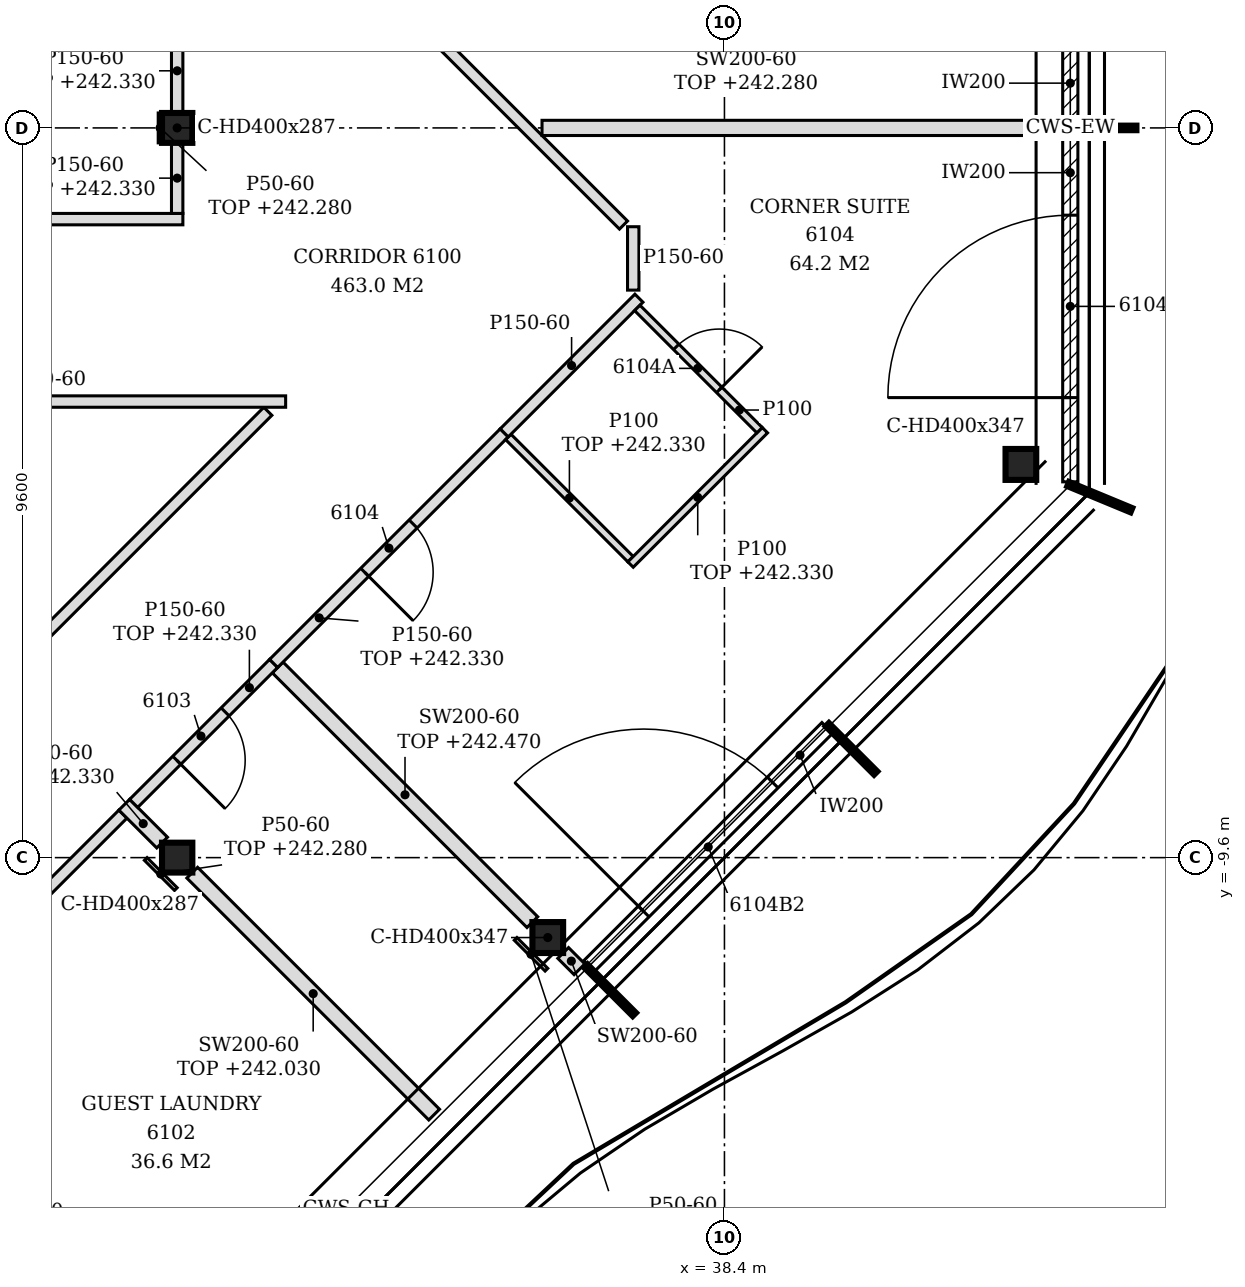
"""IFC4 building model, lengths in metres.
Left out: names, types, materials, properties, quantities, classifications, styles, units other than length and angle.
Written with IfcOpenShell. Run it as: python <this file> out.ifc"""

import sys

from ifc_helpers import new_model, si_unit, direction, frame, frame_2d, origin, origin_2d, place, context, subcontext, project, spatial, polyline, rectangle, i_section, outline, extrude, element, fill, save


model = new_model("IFC4")
c1 = context("Model", 3, precision=1e-05, world=origin(), true_north=direction((0.0, 1.0)))
c2 = subcontext(c1, "Body", "Model", "MODEL_VIEW")
j1 = project(units=[si_unit("LENGTHUNIT", "METRE"), si_unit("PLANEANGLEUNIT", "RADIAN")], contexts=[c1])
p1 = place(None, origin())
s1 = spatial("IfcSite", under=j1, at=p1, CompositionType="ELEMENT")
p2 = place(p1, origin())
s2 = spatial("IfcBuilding", under=s1, at=p2, CompositionType="ELEMENT")
p3 = place(p2, frame((0.0, 0.0, 239.4)))
s3 = spatial("IfcBuildingStorey", under=s2, at=p3, CompositionType="ELEMENT", Elevation=239.4)
for number, where, z_axis, x_axis in (
    (1, (36.076, -10.652, -0.15), (0.0, 0.0, 1.0), (1.0, 0.0, 0.0)),
    (2, (42.3, -4.427, -0.15), (0.0, 0.0, 1.0), (1.0, 0.0, 0.0)),
):
    element("IfcColumn", number, at=place(p3, frame(where, z_axis=z_axis, x_axis=x_axis)), inside=s3, PredefinedType="COLUMN", context=c2, shape_type="SweptSolid", body=[
        extrude(i_section(OverallWidth=0.404, OverallDepth=0.407, WebThickness=0.027, FlangeThickness=0.044, FilletRadius=0.015, at=origin_2d()), origin(), (0.0, 0.0, 1.0), 3.6),
    ])
for number, where, z_axis, x_axis in (
    (3, (31.2, -9.6, -0.15), (0.0, 0.0, 1.0), (1.0, 0.0, 0.0)),
    (4, (31.2, 0.0, -0.15), (0.0, 0.0, 1.0), (1.0, 0.0, 0.0)),
):
    element("IfcColumn", number, at=place(p3, frame(where, z_axis=z_axis, x_axis=x_axis)), inside=s3, PredefinedType="COLUMN", context=c2, shape_type="SweptSolid", body=[
        extrude(i_section(OverallWidth=0.399, OverallDepth=0.393, WebThickness=0.023, FlangeThickness=0.037, FilletRadius=0.015, at=origin_2d()), origin(), (0.0, 0.0, 1.0), 3.6),
    ])
p4 = place(p3, frame((36.62, -11.026, 0.0), z_axis=(0.0, 0.0, 1.0), x_axis=(0.707106781187, 0.707106781187, 0.0)))
e5 = element("IfcWall", 5, at=p4, inside=s3, PredefinedType="NOTDEFINED", context=c2, shape_type="SweptSolid", body=[
    extrude(rectangle(XDim=4.431, YDim=0.2, at=frame_2d((2.215, 0.0))), origin(), (0.0, 0.0, 1.0), 3.45),
])
p5 = place(p4, frame((1.015, 0.0, 0.0)))
e6 = element("IfcOpeningElement", 6, at=p5, cuts=e5, PredefinedType="OPENING", context=c2, shape_type="SweptSolid", body=[
    extrude(rectangle(XDim=2.4, YDim=2.4, at=frame_2d((1.2, 1.2))), frame((0.0, 0.11, 0.0), z_axis=(0.0, -1.0, 0.0), x_axis=(1.0, 0.0, 0.0)), (0.0, 0.0, 1.0), 0.22),
])
p6 = place(p3, frame((42.95, -4.656, 0.0), z_axis=(0.0, 0.0, 1.0), x_axis=(0.0, 1.0, 0.0)))
e7 = element("IfcWall", 7, at=p6, inside=s3, PredefinedType="NOTDEFINED", context=c2, shape_type="SweptSolid", body=[
    extrude(rectangle(XDim=4.626, YDim=0.2, at=frame_2d((2.313, 0.0))), origin(), (0.0, 0.0, 1.0), 3.45),
])
p7 = place(p6, frame((1.108, 0.0, 0.0)))
e8 = element("IfcOpeningElement", 8, at=p7, cuts=e7, PredefinedType="OPENING", context=c2, shape_type="SweptSolid", body=[
    extrude(rectangle(XDim=2.4, YDim=2.4, at=frame_2d((1.2, 1.2))), frame((0.0, 0.11, 0.0), z_axis=(0.0, -1.0, 0.0), x_axis=(1.0, 0.0, 0.0)), (0.0, 0.0, 1.0), 0.22),
])
p8 = place(p3, frame((42.95, 0.03, 0.0), z_axis=(0.0, 0.0, 1.0), x_axis=(0.0, 1.0, 0.0)))
e9 = element("IfcWall", 9, at=p8, inside=s3, PredefinedType="NOTDEFINED", context=c2, shape_type="SweptSolid", body=[
    extrude(rectangle(XDim=4.626, YDim=0.2, at=frame_2d((2.313, 0.0))), origin(), (0.0, 0.0, 1.0), 3.45),
])
p9 = place(p8, frame((1.118, 0.0, 0.0)))
e10 = element("IfcOpeningElement", 10, at=p9, cuts=e9, PredefinedType="OPENING", context=c2, shape_type="SweptSolid", body=[
    extrude(rectangle(XDim=2.4, YDim=2.4, at=frame_2d((1.2, 1.2))), frame((0.0, 0.11, 0.0), z_axis=(0.0, -1.0, 0.0), x_axis=(1.0, 0.0, 0.0)), (0.0, 0.0, 1.0), 0.22),
])
p10 = place(p3, frame((29.649, -16.673, 0.0), z_axis=(0.0, 0.0, 1.0), x_axis=(-0.707181695824, 0.707031858612, 0.0)))
e11 = element("IfcWall", 11, at=p10, inside=s3, PredefinedType="PARTITIONING", context=c2, shape_type="SweptSolid", body=[
    extrude(rectangle(XDim=4.888, YDim=0.2, at=frame_2d((2.444, 0.0))), origin(), (0.0, 0.0, 1.0), 2.88),
])
p11 = place(p3, frame((26.316, -13.199, 0.0), z_axis=(0.0, 0.0, 1.0), x_axis=(0.707024001185, 0.707189551498, 0.0)))
e12 = element("IfcWall", 12, at=p11, inside=s3, PredefinedType="PARTITIONING", context=c2, shape_type="SweptSolid", body=[
    extrude(rectangle(XDim=5.899, YDim=0.15, at=frame_2d((2.949, 0.0))), origin(), (0.0, 0.0, 1.0), 2.88),
])
p12 = place(p11, frame((2.5, 0.0, 0.0)))
e13 = element("IfcOpeningElement", 13, at=p12, cuts=e12, PredefinedType="OPENING", context=c2, shape_type="SweptSolid", body=[
    extrude(rectangle(XDim=0.9, YDim=2.1, at=frame_2d((0.45, 1.05))), frame((0.0, 0.085, 0.0), z_axis=(0.0, -1.0, 0.0), x_axis=(1.0, 0.0, 0.0)), (0.0, 0.0, 1.0), 0.17),
])
p13 = place(p3, frame((34.581, -12.981, 0.0), z_axis=(0.0, 0.0, 1.0), x_axis=(-0.707133900936, 0.707079660397, 0.0)))
e14 = element("IfcWall", 14, at=p13, inside=s3, PredefinedType="PARTITIONING", context=c2, shape_type="SweptSolid", body=[
    extrude(rectangle(XDim=4.501, YDim=0.2, at=frame_2d((2.25, 0.0))), origin(), (0.0, 0.0, 1.0), 2.63),
])
p14 = place(p3, frame((24.468, -11.653, 0.0), z_axis=(0.0, 0.0, 1.0), x_axis=(0.707095889299, 0.707117672906, 0.0)))
e15 = element("IfcWall", 15, at=p14, inside=s3, PredefinedType="PARTITIONING", context=c2, shape_type="SweptSolid", body=[
    extrude(rectangle(XDim=11.208, YDim=0.15, at=frame_2d((5.604, 0.0))), origin(), (0.0, 0.0, 1.0), 2.88),
])
p15 = place(p3, frame((36.493, -11.069, 0.0), z_axis=(0.0, 0.0, 1.0), x_axis=(-0.707106781187, 0.707106781187, 0.0)))
e16 = element("IfcWall", 16, at=p15, inside=s3, PredefinedType="PARTITIONING", context=c2, shape_type="SweptSolid", body=[
    extrude(rectangle(XDim=0.303, YDim=0.2, at=frame_2d((0.152, 0.0))), origin(), (0.0, 0.0, 1.0), 3.45),
])
p16 = place(p3, frame((35.873, -10.449, 0.0), z_axis=(0.0, 0.0, 1.0), x_axis=(-0.707081021846, 0.707132539589, 0.0)))
e17 = element("IfcWall", 17, at=p16, inside=s3, PredefinedType="PARTITIONING", context=c2, shape_type="SweptSolid", body=[
    extrude(rectangle(XDim=4.739, YDim=0.2, at=frame_2d((2.37, 0.0))), origin(), (0.0, 0.0, 1.0), 3.07),
])
p17 = place(p3, frame((31.002, -9.402, 0.0), z_axis=(0.0, 0.0, 1.0), x_axis=(-0.707106781187, 0.707106781187, 0.0)))
e18 = element("IfcWall", 18, at=p17, inside=s3, PredefinedType="PARTITIONING", context=c2, shape_type="SweptSolid", body=[
    extrude(rectangle(XDim=0.704, YDim=0.2, at=frame_2d((0.352, 0.0))), origin(), (0.0, 0.0, 1.0), 2.93),
])
p18 = place(p3, frame((30.628, -8.886, 0.0), z_axis=(0.0, 0.0, 1.0), x_axis=(0.707106781187, 0.707106781187, 0.0)))
e19 = element("IfcWall", 19, at=p18, inside=s3, PredefinedType="PARTITIONING", context=c2, shape_type="SweptSolid", body=[
    extrude(rectangle(XDim=2.604, YDim=0.15, at=frame_2d((1.302, 0.0))), origin(), (0.0, 0.0, 1.0), 2.93),
])
p19 = place(p18, frame((0.802, 0.0, 0.0)))
e20 = element("IfcOpeningElement", 20, at=p19, cuts=e19, PredefinedType="OPENING", context=c2, shape_type="SweptSolid", body=[
    extrude(rectangle(XDim=0.9, YDim=2.1, at=frame_2d((0.45, 1.05))), frame((0.0, 0.085, 0.0), z_axis=(0.0, -1.0, 0.0), x_axis=(1.0, 0.0, 0.0)), (0.0, 0.0, 1.0), 0.17),
])
p20 = place(p3, frame((32.469, -7.045, 0.0), z_axis=(0.0, 0.0, 1.0), x_axis=(0.70722059203, 0.706992952022, 0.0)))
e21 = element("IfcWall", 21, at=p20, inside=s3, PredefinedType="PARTITIONING", context=c2, shape_type="SweptSolid", body=[
    extrude(rectangle(XDim=4.29, YDim=0.15, at=frame_2d((2.145, 0.0))), origin(), (0.0, 0.0, 1.0), 2.93),
])
p21 = place(p20, frame((1.695, 0.0, 0.0)))
e22 = element("IfcOpeningElement", 22, at=p21, cuts=e21, PredefinedType="OPENING", context=c2, shape_type="SweptSolid", body=[
    extrude(rectangle(XDim=0.9, YDim=2.1, at=frame_2d((0.45, 1.05))), frame((0.0, 0.085, 0.0), z_axis=(0.0, -1.0, 0.0), x_axis=(1.0, 0.0, 0.0)), (0.0, 0.0, 1.0), 0.17),
])
p22 = place(p3, frame((37.165, -5.674, 0.0), z_axis=(0.0, 0.0, 1.0), x_axis=(-0.707106781187, 0.707106781187, 0.0)))
e23 = element("IfcWall", 23, at=p22, inside=s3, PredefinedType="PARTITIONING", context=c2, shape_type="SweptSolid", body=[
    extrude(rectangle(XDim=2.275, YDim=0.1, at=frame_2d((1.137, 0.0))), origin(), (0.0, 0.0, 1.0), 2.93),
])
p23 = place(p3, frame((37.165, -5.744, 0.0), z_axis=(0.0, 0.0, 1.0), x_axis=(0.707155609469, 0.707057949532, 0.0)))
e24 = element("IfcWall", 24, at=p23, inside=s3, PredefinedType="PARTITIONING", context=c2, shape_type="SweptSolid", body=[
    extrude(rectangle(XDim=2.5, YDim=0.1, at=frame_2d((1.25, 0.0))), origin(), (0.0, 0.0, 1.0), 2.93),
])
p24 = place(p3, frame((35.503, -4.012, 0.0), z_axis=(0.0, 0.0, 1.0), x_axis=(0.707106781187, 0.707106781187, 0.0)))
e25 = element("IfcWall", 25, at=p24, inside=s3, PredefinedType="PARTITIONING", context=c2, shape_type="SweptSolid", body=[
    extrude(rectangle(XDim=2.506, YDim=0.15, at=frame_2d((1.253, 0.0))), origin(), (0.0, 0.0, 1.0), 3.45),
])
p25 = place(p3, frame((38.862, -3.977, 0.0), z_axis=(0.0, 0.0, 1.0), x_axis=(-0.707106781187, 0.707106781187, 0.0)))
e26 = element("IfcWall", 26, at=p25, inside=s3, PredefinedType="PARTITIONING", context=c2, shape_type="SweptSolid", body=[
    extrude(rectangle(XDim=2.275, YDim=0.1, at=frame_2d((1.137, 0.0))), origin(), (0.0, 0.0, 1.0), 3.45),
])
p26 = place(p25, frame((0.75, 0.0, 0.0)))
e27 = element("IfcOpeningElement", 27, at=p26, cuts=e26, PredefinedType="OPENING", context=c2, shape_type="SweptSolid", body=[
    extrude(rectangle(XDim=0.8, YDim=2.1, at=frame_2d((0.4, 1.05))), frame((0.0, 0.06, 0.0), z_axis=(0.0, -1.0, 0.0), x_axis=(1.0, 0.0, 0.0)), (0.0, 0.0, 1.0), 0.12),
])
p27 = place(p3, frame((19.125, -3.6, 0.0), z_axis=(0.0, 0.0, 1.0), x_axis=(1.0, 0.0, 0.0)))
e28 = element("IfcWall", 28, at=p27, inside=s3, PredefinedType="PARTITIONING", context=c2, shape_type="SweptSolid", body=[
    extrude(outline(polyline([(0.0, 0.0), (13.502, 0.0), (13.502, 3.45), (12.225, 3.45), (12.223, 2.93), (11.925, 2.93), (11.923, 3.45), (0.225, 3.45), (0.223, 2.83), (0.0, 2.83), (0.0, 0.0)])), frame((0.0, 0.075, 0.0), z_axis=(0.0, -1.0, 0.0), x_axis=(1.0, 0.0, 0.0)), (0.0, 0.0, 1.0), 0.15),
])
p28 = place(p27, frame((6.286, 0.0, 0.0)))
e29 = element("IfcOpeningElement", 29, at=p28, cuts=e28, PredefinedType="OPENING", context=c2, shape_type="SweptSolid", body=[
    extrude(rectangle(XDim=0.9, YDim=2.1, at=frame_2d((0.45, 1.05))), frame((0.0, 0.085, 0.0), z_axis=(0.0, -1.0, 0.0), x_axis=(1.0, 0.0, 0.0)), (0.0, 0.0, 1.0), 0.17),
])
p29 = place(p3, frame((37.2, -2.134, 0.0), z_axis=(0.0, 0.0, 1.0), x_axis=(0.0, 1.0, 0.0)))
e30 = element("IfcWall", 30, at=p29, inside=s3, PredefinedType="PARTITIONING", context=c2, shape_type="SweptSolid", body=[
    extrude(rectangle(XDim=0.834, YDim=0.15, at=frame_2d((0.417, 0.0))), origin(), (0.0, 0.0, 1.0), 3.45),
])
p30 = place(p3, frame((37.072, -1.278, 0.0), z_axis=(0.0, 0.0, 1.0), x_axis=(-0.707106781187, 0.707106781187, 0.0)))
e31 = element("IfcWall", 31, at=p30, inside=s3, PredefinedType="PARTITIONING", context=c2, shape_type="SweptSolid", body=[
    extrude(rectangle(XDim=20.294, YDim=0.15, at=frame_2d((10.147, 0.0))), origin(), (0.0, 0.0, 1.0), 2.88),
])
p31 = place(p30, frame((3.824, 0.0, 0.0)))
e32 = element("IfcOpeningElement", 32, at=p31, cuts=e31, PredefinedType="OPENING", context=c2, shape_type="SweptSolid", body=[
    extrude(rectangle(XDim=0.9, YDim=2.1, at=frame_2d((0.45, 1.05))), frame((0.0, 0.085, 0.0), z_axis=(0.0, -1.0, 0.0), x_axis=(1.0, 0.0, 0.0)), (0.0, 0.0, 1.0), 0.17),
])
p32 = place(p30, frame((10.042, 0.0, 0.0)))
e33 = element("IfcOpeningElement", 33, at=p32, cuts=e31, PredefinedType="OPENING", context=c2, shape_type="SweptSolid", body=[
    extrude(rectangle(XDim=0.9, YDim=2.1, at=frame_2d((0.45, 1.05))), frame((0.0, 0.085, 0.0), z_axis=(0.0, -1.0, 0.0), x_axis=(1.0, 0.0, 0.0)), (0.0, 0.0, 1.0), 0.17),
])
p33 = place(p30, frame((14.443, 0.0, 0.0)))
e34 = element("IfcOpeningElement", 34, at=p33, cuts=e31, PredefinedType="OPENING", context=c2, shape_type="SweptSolid", body=[
    extrude(rectangle(XDim=0.9, YDim=2.1, at=frame_2d((0.45, 1.05))), frame((0.0, 0.085, 0.0), z_axis=(0.0, -1.0, 0.0), x_axis=(1.0, 0.0, 0.0)), (0.0, 0.0, 1.0), 0.17),
])
p34 = place(p3, frame((19.125, -1.2, 0.0), z_axis=(0.0, 0.0, 1.0), x_axis=(1.0, 0.0, 0.0)))
e35 = element("IfcWall", 35, at=p34, inside=s3, PredefinedType="PARTITIONING", context=c2, shape_type="SweptSolid", body=[
    extrude(outline(polyline([(0.0, 0.0), (12.15, 0.0), (12.15, 2.93), (11.925, 2.93), (11.923, 3.45), (0.225, 3.45), (0.223, 2.83), (0.0, 2.83), (0.0, 0.0)])), frame((0.0, 0.075, 0.0), z_axis=(0.0, -1.0, 0.0), x_axis=(1.0, 0.0, 0.0)), (0.0, 0.0, 1.0), 0.15),
])
p35 = place(p3, frame((31.2, -1.125, 0.0), z_axis=(0.0, 0.0, 1.0), x_axis=(0.0, 1.0, 0.0)))
e36 = element("IfcWall", 36, at=p35, inside=s3, PredefinedType="PARTITIONING", context=c2, shape_type="SweptSolid", body=[
    extrude(rectangle(XDim=0.928, YDim=0.15, at=frame_2d((0.464, 0.0))), origin(), (0.0, 0.0, 1.0), 2.93),
])
p36 = place(p3, frame((36.0, 0.0, 0.0), z_axis=(0.0, 0.0, 1.0), x_axis=(1.0, 0.0, 0.0)))
e37 = element("IfcWall", 37, at=p36, inside=s3, PredefinedType="PARTITIONING", context=c2, shape_type="SweptSolid", body=[
    extrude(rectangle(XDim=6.85, YDim=0.2, at=frame_2d((3.425, 0.0))), origin(), (0.0, 0.0, 1.0), 2.88),
])
p37 = place(p3, frame((31.2, 0.197, 0.0), z_axis=(0.0, 0.0, 1.0), x_axis=(0.0, 1.0, 0.0)))
e38 = element("IfcWall", 38, at=p37, inside=s3, PredefinedType="PARTITIONING", context=c2, shape_type="SweptSolid", body=[
    extrude(rectangle(XDim=1.11, YDim=0.15, at=frame_2d((0.555, 0.0))), origin(), (0.0, 0.0, 1.0), 2.93),
])
p38 = place(p3, frame((31.182, -10.014, 0.0), z_axis=(0.0, 0.0, 1.0), x_axis=(-0.707106781187, 0.707106781187, 0.0)))
e39 = element("IfcWall", 39, at=p38, inside=s3, PredefinedType="PARTITIONING", context=c2, shape_type="SweptSolid", body=[
    extrude(rectangle(XDim=0.56, YDim=0.05, at=frame_2d((0.28, 0.0))), origin(), (0.0, 0.0, 1.0), 2.88),
])
p39 = place(p3, frame((36.058, -11.075, 0.0), z_axis=(0.0, 0.0, 1.0), x_axis=(-0.707106781187, 0.707106781187, 0.0)))
e40 = element("IfcWall", 40, at=p39, inside=s3, PredefinedType="PARTITIONING", context=c2, shape_type="SweptSolid", body=[
    extrude(rectangle(XDim=0.573, YDim=0.05, at=frame_2d((0.287, 0.0))), origin(), (0.0, 0.0, 1.0), 2.63),
])
p40 = place(p3, frame((30.976, -0.197, 0.0), z_axis=(0.0, 0.0, 1.0), x_axis=(0.0, 1.0, 0.0)))
e41 = element("IfcWall", 41, at=p40, inside=s3, PredefinedType="PARTITIONING", context=c2, shape_type="SweptSolid", body=[
    extrude(rectangle(XDim=0.393, YDim=0.05, at=frame_2d((0.197, 0.0))), origin(), (0.0, 0.0, 1.0), 2.88),
])
p41 = place(p5, origin())
e42 = element("IfcDoor", 42, at=p41, inside=s3, OperationType="SINGLE_SWING_LEFT", PredefinedType="DOOR", context=c2, shape_type="SweptSolid", body=[
    extrude(rectangle(XDim=2.4, YDim=2.4, at=frame_2d((1.2, 1.2))), frame((0.0, 0.025, 0.0), z_axis=(0.0, -1.0, 0.0), x_axis=(1.0, 0.0, 0.0)), (0.0, 0.0, 1.0), 0.05),
])
fill(e6, e42)
p42 = place(p7, origin())
e43 = element("IfcDoor", 43, at=p42, inside=s3, OperationType="SINGLE_SWING_LEFT", PredefinedType="DOOR", context=c2, shape_type="SweptSolid", body=[
    extrude(rectangle(XDim=2.4, YDim=2.4, at=frame_2d((1.2, 1.2))), frame((0.0, 0.025, 0.0), z_axis=(0.0, -1.0, 0.0), x_axis=(1.0, 0.0, 0.0)), (0.0, 0.0, 1.0), 0.05),
])
fill(e8, e43)
p43 = place(p19, frame((0.9, 0.0, 0.0), z_axis=(0.0, 0.0, 1.0), x_axis=(-1.0, 0.0, 0.0)))
e44 = element("IfcDoor", 44, at=p43, inside=s3, OperationType="SINGLE_SWING_RIGHT", PredefinedType="DOOR", context=c2, shape_type="SweptSolid", body=[
    extrude(rectangle(XDim=0.9, YDim=2.1, at=frame_2d((0.45, 1.05))), frame((0.0, 0.025, 0.0), z_axis=(0.0, -1.0, 0.0), x_axis=(1.0, 0.0, 0.0)), (0.0, 0.0, 1.0), 0.05),
])
fill(e20, e44)
p44 = place(p21, frame((0.9, 0.0, 0.0), z_axis=(0.0, 0.0, 1.0), x_axis=(-1.0, 0.0, 0.0)))
e45 = element("IfcDoor", 45, at=p44, inside=s3, OperationType="SINGLE_SWING_RIGHT", PredefinedType="DOOR", context=c2, shape_type="SweptSolid", body=[
    extrude(rectangle(XDim=0.9, YDim=2.1, at=frame_2d((0.45, 1.05))), frame((0.0, 0.025, 0.0), z_axis=(0.0, -1.0, 0.0), x_axis=(1.0, 0.0, 0.0)), (0.0, 0.0, 1.0), 0.05),
])
fill(e22, e45)
p45 = place(p26, frame((0.8, 0.0, 0.0), z_axis=(0.0, 0.0, 1.0), x_axis=(-1.0, 0.0, 0.0)))
e46 = element("IfcDoor", 46, at=p45, inside=s3, OperationType="SINGLE_SWING_RIGHT", PredefinedType="DOOR", context=c2, shape_type="SweptSolid", body=[
    extrude(rectangle(XDim=0.8, YDim=2.1, at=frame_2d((0.4, 1.05))), frame((0.0, 0.025, 0.0), z_axis=(0.0, -1.0, 0.0), x_axis=(1.0, 0.0, 0.0)), (0.0, 0.0, 1.0), 0.05),
])
fill(e27, e46)
save(model, sys.argv[1])
